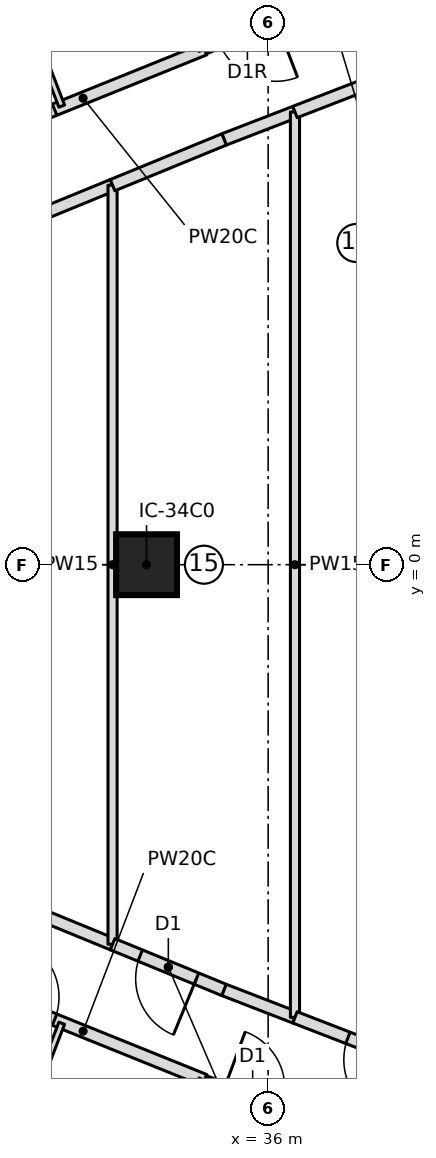
"""IFC4 building model, lengths in metres.
Left out: names, types, materials, properties, quantities, classifications, styles, units other than length and angle.
Written with IfcOpenShell. Run it as: python <this file> out.ifc"""

import sys

from ifc_helpers import new_model, si_unit, direction, frame, frame_2d, origin, origin_2d, place, context, subcontext, project, spatial, rectangle, extrude, element, fill, save


model = new_model("IFC4")
c1 = context("Model", 3, precision=1e-05, world=origin(), true_north=direction((0.0, 1.0)))
c2 = subcontext(c1, "Body", "Model", "MODEL_VIEW")
j1 = project(units=[si_unit("LENGTHUNIT", "METRE"), si_unit("PLANEANGLEUNIT", "RADIAN")], contexts=[c1])
p1 = place(None, origin())
s1 = spatial("IfcSite", under=j1, at=p1, CompositionType="ELEMENT")
p2 = place(p1, origin())
s2 = spatial("IfcBuilding", under=s1, at=p2, CompositionType="ELEMENT")
p3 = place(p2, frame((0.0, 0.0, 207.45)))
s3 = spatial("IfcBuildingStorey", under=s2, at=p3, CompositionType="ELEMENT", Elevation=207.45)
p4 = place(p3, frame((34.0, 0.0, 0.0), z_axis=(0.0, 0.0, 1.0), x_axis=(1.0, 0.0, 0.0)))
e1 = element("IfcColumn", 1, at=p4, inside=s3, PredefinedType="COLUMN", context=c2, shape_type="SweptSolid", body=[
    extrude(rectangle(XDim=1.0, YDim=1.0, at=origin_2d()), origin(), (0.0, 0.0, 1.0), 3.55),
])
p5 = place(p3, frame((30.958, 6.866, 0.0), z_axis=(0.0, 0.0, 1.0), x_axis=(0.927398695046, 0.374074404933, 0.0)))
e2 = element("IfcWall", 2, at=p5, inside=s3, PredefinedType="PARTITIONING", context=c2, shape_type="SweptSolid", body=[
    extrude(rectangle(XDim=4.311, YDim=0.2, at=frame_2d((2.155, 0.0))), origin(), (0.0, 0.0, 1.0), 3.15),
])
p6 = place(p5, frame((0.65, 0.0, 0.0)))
e3 = element("IfcOpeningElement", 3, at=p6, cuts=e2, PredefinedType="OPENING", context=c2, shape_type="SweptSolid", body=[
    extrude(rectangle(XDim=1.0, YDim=2.1, at=frame_2d((0.5, 1.05))), frame((0.0, 0.11, 0.0), z_axis=(0.0, -1.0, 0.0), x_axis=(1.0, 0.0, 0.0)), (0.0, 0.0, 1.0), 0.22),
])
p7 = place(p3, frame((32.605, 7.542, 0.0), z_axis=(0.0, 0.0, 1.0), x_axis=(-0.359637744424, 0.933092006603, 0.0)))
e4 = element("IfcWall", 4, at=p7, inside=s3, PredefinedType="PARTITIONING", context=c2, shape_type="SweptSolid", body=[
    extrude(rectangle(XDim=2.98, YDim=0.1, at=frame_2d((1.49, 0.0))), origin(), (0.0, 0.0, 1.0), 3.15),
])
p8 = place(p7, frame((1.45, 0.0, 0.0)))
e5 = element("IfcOpeningElement", 5, at=p8, cuts=e4, PredefinedType="OPENING", context=c2, shape_type="SweptSolid", body=[
    extrude(rectangle(XDim=0.8, YDim=2.1, at=frame_2d((0.4, 1.05))), frame((0.0, 0.06, 0.0), z_axis=(0.0, -1.0, 0.0), x_axis=(1.0, 0.0, 0.0)), (0.0, 0.0, 1.0), 0.12),
])
p9 = place(p3, frame((38.972, 10.045, 0.0), z_axis=(0.0, 0.0, 1.0), x_axis=(-0.93335728106, -0.358948723208, 0.0)))
e6 = element("IfcWall", 6, at=p9, inside=s3, PredefinedType="PARTITIONING", context=c2, shape_type="SweptSolid", body=[
    extrude(rectangle(XDim=4.312, YDim=0.2, at=frame_2d((2.156, 0.0))), origin(), (0.0, 0.0, 1.0), 3.15),
])
p10 = place(p9, frame((3.05, 0.0, 0.0)))
e7 = element("IfcOpeningElement", 7, at=p10, cuts=e6, PredefinedType="OPENING", context=c2, shape_type="SweptSolid", body=[
    extrude(rectangle(XDim=1.0, YDim=2.1, at=frame_2d((0.5, 1.05))), frame((0.0, 0.11, 0.0), z_axis=(0.0, -1.0, 0.0), x_axis=(1.0, 0.0, 0.0)), (0.0, 0.0, 1.0), 0.22),
])
p11 = place(p3, frame((30.958, -6.866, 0.0), z_axis=(0.0, 0.0, 1.0), x_axis=(0.927398695046, -0.374074404933, 0.0)))
e8 = element("IfcWall", 8, at=p11, inside=s3, PredefinedType="PARTITIONING", context=c2, shape_type="SweptSolid", body=[
    extrude(rectangle(XDim=4.311, YDim=0.2, at=frame_2d((2.155, 0.0))), origin(), (0.0, 0.0, 1.0), 3.15),
])
p12 = place(p11, frame((0.65, 0.0, 0.0)))
e9 = element("IfcOpeningElement", 9, at=p12, cuts=e8, PredefinedType="OPENING", context=c2, shape_type="SweptSolid", body=[
    extrude(rectangle(XDim=1.0, YDim=2.1, at=frame_2d((0.5, 1.05))), frame((0.0, 0.11, 0.0), z_axis=(0.0, -1.0, 0.0), x_axis=(1.0, 0.0, 0.0)), (0.0, 0.0, 1.0), 0.22),
])
p13 = place(p3, frame((31.534, -10.323, 0.0), z_axis=(0.0, 0.0, 1.0), x_axis=(0.359610255373, 0.933102601127, 0.0)))
e10 = element("IfcWall", 10, at=p13, inside=s3, PredefinedType="PARTITIONING", context=c2, shape_type="SweptSolid", body=[
    extrude(rectangle(XDim=2.98, YDim=0.1, at=frame_2d((1.49, 0.0))), origin(), (0.0, 0.0, 1.0), 3.15),
])
p14 = place(p13, frame((0.75, 0.0, 0.0)))
e11 = element("IfcOpeningElement", 11, at=p14, cuts=e10, PredefinedType="OPENING", context=c2, shape_type="SweptSolid", body=[
    extrude(rectangle(XDim=0.8, YDim=2.1, at=frame_2d((0.4, 1.05))), frame((0.0, 0.06, 0.0), z_axis=(0.0, -1.0, 0.0), x_axis=(1.0, 0.0, 0.0)), (0.0, 0.0, 1.0), 0.12),
])
p15 = place(p3, frame((34.948, -8.497, 0.0), z_axis=(0.0, 0.0, 1.0), x_axis=(0.937864515454, -0.347001657996, 0.0)))
e12 = element("IfcWall", 12, at=p15, inside=s3, PredefinedType="PARTITIONING", context=c2, shape_type="SweptSolid", body=[
    extrude(rectangle(XDim=8.621, YDim=0.2, at=frame_2d((4.311, 0.0))), origin(), (0.0, 0.0, 1.0), 3.15),
])
p16 = place(p15, frame((0.35, 0.0, 0.0)))
e13 = element("IfcOpeningElement", 13, at=p16, cuts=e12, PredefinedType="OPENING", context=c2, shape_type="SweptSolid", body=[
    extrude(rectangle(XDim=1.0, YDim=2.1, at=frame_2d((0.5, 1.05))), frame((0.0, 0.11, 0.0), z_axis=(0.0, -1.0, 0.0), x_axis=(1.0, 0.0, 0.0)), (0.0, 0.0, 1.0), 0.22),
])
for number, where, z_axis, x_axis in (
    (14, (33.441, -6.242, 0.0), (0.0, 0.0, 1.0), (-0.925, 0.379, 0.0)),
    (15, (31.467, 5.432, 0.0), (0.0, 0.0, 1.0), (0.925, 0.379, 0.0)),
):
    element("IfcWall", number, at=place(p3, frame(where, z_axis=z_axis, x_axis=x_axis)), inside=s3, PredefinedType="PARTITIONING", context=c2, shape_type="SweptSolid", body=[
        extrude(rectangle(XDim=2.135, YDim=0.2, at=frame_2d((1.067, 0.0))), origin(), (0.0, 0.0, 1.0), 3.15),
    ])
p17 = place(p3, frame((33.441, -6.242, 0.0), z_axis=(0.0, 0.0, 1.0), x_axis=(0.0, 1.0, 0.0)))
e16 = element("IfcWall", 16, at=p17, inside=s3, PredefinedType="PARTITIONING", context=c2, shape_type="SweptSolid", body=[
    extrude(rectangle(XDim=12.484, YDim=0.15, at=frame_2d((6.242, 0.0))), origin(), (0.0, 0.0, 1.0), 3.15),
])
p18 = place(p3, frame((35.276, -6.994, 0.0), z_axis=(0.0, 0.0, 1.0), x_axis=(-0.925179705777, 0.379529329589, 0.0)))
e17 = element("IfcWall", 17, at=p18, inside=s3, PredefinedType="PARTITIONING", context=c2, shape_type="SweptSolid", body=[
    extrude(rectangle(XDim=1.983, YDim=0.2, at=frame_2d((0.991, 0.0))), origin(), (0.0, 0.0, 1.0), 3.15),
])
p19 = place(p18, frame((0.491, 0.0, 0.0)))
e18 = element("IfcOpeningElement", 18, at=p19, cuts=e17, PredefinedType="OPENING", context=c2, shape_type="SweptSolid", body=[
    extrude(rectangle(XDim=1.0, YDim=2.1, at=frame_2d((0.5, 1.05))), frame((0.0, 0.11, 0.0), z_axis=(0.0, -1.0, 0.0), x_axis=(1.0, 0.0, 0.0)), (0.0, 0.0, 1.0), 0.22),
])
for number, where, z_axis, x_axis in (
    (19, (35.276, 6.994, 0.0), (0.0, 0.0, 1.0), (0.933, 0.361, 0.0)),
    (20, (36.441, -7.445, 0.0), (0.0, 0.0, 1.0), (-0.933, 0.361, 0.0)),
):
    element("IfcWall", number, at=place(p3, frame(where, z_axis=z_axis, x_axis=x_axis)), inside=s3, PredefinedType="PARTITIONING", context=c2, shape_type="SweptSolid", body=[
        extrude(rectangle(XDim=1.25, YDim=0.2, at=frame_2d((0.625, 0.0))), origin(), (0.0, 0.0, 1.0), 3.15),
    ])
p20 = place(p3, frame((33.441, 6.242, 0.0), z_axis=(0.0, 0.0, 1.0), x_axis=(0.925179705777, 0.379529329589, 0.0)))
e21 = element("IfcWall", 21, at=p20, inside=s3, PredefinedType="PARTITIONING", context=c2, shape_type="SweptSolid", body=[
    extrude(rectangle(XDim=1.983, YDim=0.2, at=frame_2d((0.991, 0.0))), origin(), (0.0, 0.0, 1.0), 3.15),
])
p21 = place(p3, frame((36.441, -7.445, 0.0), z_axis=(0.0, 0.0, 1.0), x_axis=(0.0, 1.0, 0.0)))
e22 = element("IfcWall", 22, at=p21, inside=s3, PredefinedType="PARTITIONING", context=c2, shape_type="SweptSolid", body=[
    extrude(rectangle(XDim=14.89, YDim=0.15, at=frame_2d((7.445, 0.0))), origin(), (0.0, 0.0, 1.0), 3.15),
])
p22 = place(p3, frame((39.115, -8.479, 0.0), z_axis=(0.0, 0.0, 1.0), x_axis=(-0.932650373077, 0.36078148733, 0.0)))
e23 = element("IfcWall", 23, at=p22, inside=s3, PredefinedType="PARTITIONING", context=c2, shape_type="SweptSolid", body=[
    extrude(rectangle(XDim=2.867, YDim=0.2, at=frame_2d((1.434, 0.0))), origin(), (0.0, 0.0, 1.0), 3.15),
])
p23 = place(p22, frame((0.934, 0.0, 0.0)))
e24 = element("IfcOpeningElement", 24, at=p23, cuts=e23, PredefinedType="OPENING", context=c2, shape_type="SweptSolid", body=[
    extrude(rectangle(XDim=1.0, YDim=2.1, at=frame_2d((0.5, 1.05))), frame((0.0, 0.11, 0.0), z_axis=(0.0, -1.0, 0.0), x_axis=(1.0, 0.0, 0.0)), (0.0, 0.0, 1.0), 0.22),
])
p24 = place(p3, frame((36.441, 7.445, 0.0), z_axis=(0.0, 0.0, 1.0), x_axis=(0.932650373077, 0.36078148733, 0.0)))
e25 = element("IfcWall", 25, at=p24, inside=s3, PredefinedType="PARTITIONING", context=c2, shape_type="SweptSolid", body=[
    extrude(rectangle(XDim=2.867, YDim=0.2, at=frame_2d((1.434, 0.0))), origin(), (0.0, 0.0, 1.0), 3.15),
])
p25 = place(p6, origin())
e26 = element("IfcDoor", 26, at=p25, inside=s3, OperationType="SINGLE_SWING_RIGHT", PredefinedType="DOOR", context=c2, shape_type="SweptSolid", body=[
    extrude(rectangle(XDim=1.0, YDim=2.1, at=frame_2d((0.5, 1.05))), frame((0.0, 0.025, 0.0), z_axis=(0.0, -1.0, 0.0), x_axis=(1.0, 0.0, 0.0)), (0.0, 0.0, 1.0), 0.05),
])
fill(e3, e26)
p26 = place(p12, origin())
e27 = element("IfcDoor", 27, at=p26, inside=s3, OperationType="SINGLE_SWING_LEFT", PredefinedType="DOOR", context=c2, shape_type="SweptSolid", body=[
    extrude(rectangle(XDim=1.0, YDim=2.1, at=frame_2d((0.5, 1.05))), frame((0.0, 0.025, 0.0), z_axis=(0.0, -1.0, 0.0), x_axis=(1.0, 0.0, 0.0)), (0.0, 0.0, 1.0), 0.05),
])
fill(e9, e27)
p27 = place(p19, origin())
e28 = element("IfcDoor", 28, at=p27, inside=s3, OperationType="SINGLE_SWING_LEFT", PredefinedType="DOOR", context=c2, shape_type="SweptSolid", body=[
    extrude(rectangle(XDim=1.0, YDim=2.1, at=frame_2d((0.5, 1.05))), frame((0.0, 0.025, 0.0), z_axis=(0.0, -1.0, 0.0), x_axis=(1.0, 0.0, 0.0)), (0.0, 0.0, 1.0), 0.05),
])
fill(e18, e28)
p28 = place(p23, origin())
e29 = element("IfcDoor", 29, at=p28, inside=s3, OperationType="SINGLE_SWING_RIGHT", PredefinedType="DOOR", context=c2, shape_type="SweptSolid", body=[
    extrude(rectangle(XDim=1.0, YDim=2.1, at=frame_2d((0.5, 1.05))), frame((0.0, 0.025, 0.0), z_axis=(0.0, -1.0, 0.0), x_axis=(1.0, 0.0, 0.0)), (0.0, 0.0, 1.0), 0.05),
])
fill(e24, e29)
save(model, sys.argv[1])
